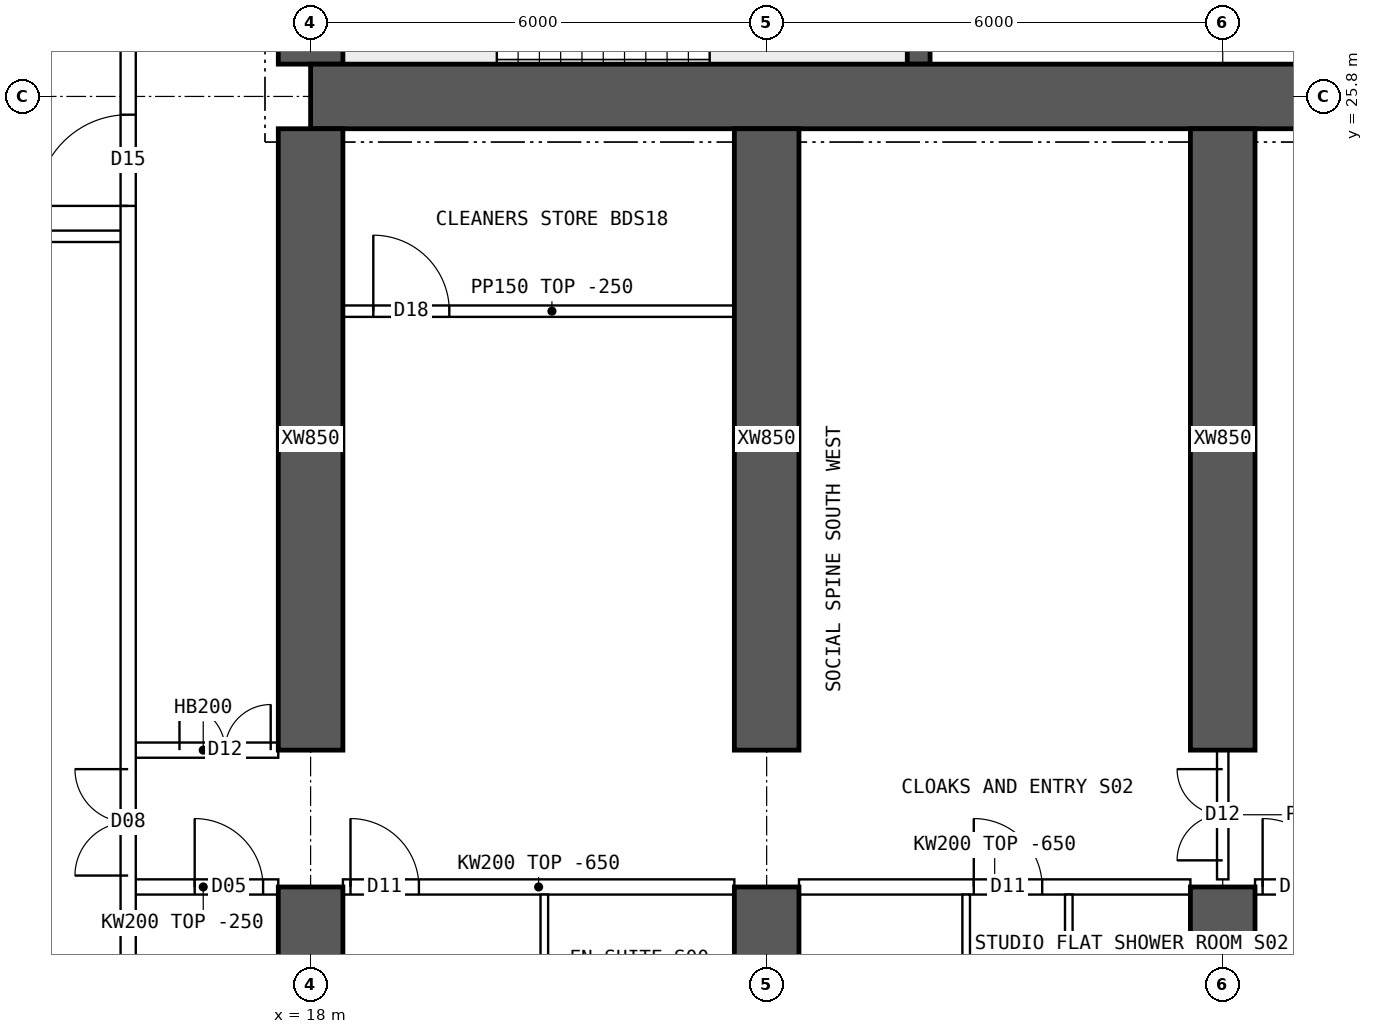
"""IFC4 building model, lengths in metres.
Left out: names, types, materials, properties, quantities, classifications, styles, units other than length and angle.
Written with IfcOpenShell. Run it as: python <this file> out.ifc"""

import sys

from ifc_helpers import new_model, si_unit, direction, frame, frame_2d, origin, place, context, subcontext, project, spatial, polyline, rectangle, outline, extrude, element, fill, save


model = new_model("IFC4")
c1 = context("Model", 3, precision=1e-05, world=origin(), true_north=direction((0.0, 1.0)))
c2 = subcontext(c1, "Body", "Model", "MODEL_VIEW")
j1 = project(units=[si_unit("LENGTHUNIT", "METRE"), si_unit("PLANEANGLEUNIT", "RADIAN")], contexts=[c1])
p1 = place(None, origin())
s1 = spatial("IfcSite", under=j1, at=p1, CompositionType="ELEMENT")
p2 = place(p1, origin())
s2 = spatial("IfcBuilding", under=s1, at=p2, CompositionType="ELEMENT")
p3 = place(p2, frame((0.0, 0.0, 167.35)))
s3 = spatial("IfcBuildingStorey", under=s2, at=p3, CompositionType="ELEMENT", Elevation=167.35)
p4 = place(p3, frame((18.0, 25.8, 0.0), z_axis=(0.0, 0.0, 1.0), x_axis=(1.0, 0.0, 0.0)))
e1 = element("IfcWall", 1, at=p4, inside=s3, PredefinedType="SHEAR", context=c2, shape_type="SweptSolid", body=[
    extrude(rectangle(XDim=48.0, YDim=0.85, at=frame_2d((24.0, 0.0))), origin(), (0.0, 0.0, 1.0), 3.75),
])
p5 = place(p3, frame((18.0, 26.225, 0.0), z_axis=(0.0, 0.0, 1.0), x_axis=(0.0, 1.0, 0.0)))
e2 = element("IfcWall", 2, at=p5, inside=s3, PredefinedType="SHEAR", context=c2, shape_type="SweptSolid", body=[
    extrude(rectangle(XDim=11.55, YDim=0.85, at=frame_2d((5.775, 0.0))), origin(), (0.0, 0.0, 1.0), 3.75),
])
p6 = place(p5, frame((5.075, 0.0, 0.0)))
e3 = element("IfcOpeningElement", 3, at=p6, cuts=e2, PredefinedType="OPENING", context=c2, shape_type="SweptSolid", body=[
    extrude(rectangle(XDim=1.2, YDim=2.1, at=frame_2d((0.6, 1.05))), frame((0.0, 0.435, 0.0), z_axis=(0.0, -1.0, 0.0), x_axis=(1.0, 0.0, 0.0)), (0.0, 0.0, 1.0), 0.87),
])
p7 = place(p3, frame((26.0, 26.225, 0.0), z_axis=(0.0, 0.0, 1.0), x_axis=(0.0, 1.0, 0.0)))
e4 = element("IfcWall", 4, at=p7, inside=s3, PredefinedType="SHEAR", context=c2, shape_type="SweptSolid", body=[
    extrude(rectangle(XDim=4.025, YDim=0.3, at=frame_2d((2.012, 0.0))), origin(), (0.0, 0.0, 1.0), 3.75),
])
p8 = place(p3, frame((18.0, 10.0, 0.0), z_axis=(0.0, 0.0, 1.0), x_axis=(0.0, 1.0, 0.0)))
e5 = element("IfcWall", 5, at=p8, inside=s3, PredefinedType="SHEAR", context=c2, shape_type="SweptSolid", body=[
    extrude(rectangle(XDim=5.4, YDim=0.85, at=frame_2d((2.7, 0.0))), origin(), (0.0, 0.0, 1.0), 3.75),
])
p9 = place(p3, frame((18.0, 17.2, 0.0), z_axis=(0.0, 0.0, 1.0), x_axis=(0.0, 1.0, 0.0)))
e6 = element("IfcWall", 6, at=p9, inside=s3, PredefinedType="SHEAR", context=c2, shape_type="SweptSolid", body=[
    extrude(rectangle(XDim=8.175, YDim=0.85, at=frame_2d((4.087, 0.0))), origin(), (0.0, 0.0, 1.0), 3.75),
])
p10 = place(p3, frame((24.0, 10.0, 0.0), z_axis=(0.0, 0.0, 1.0), x_axis=(0.0, 1.0, 0.0)))
e7 = element("IfcWall", 7, at=p10, inside=s3, PredefinedType="SHEAR", context=c2, shape_type="SweptSolid", body=[
    extrude(rectangle(XDim=5.4, YDim=0.85, at=frame_2d((2.7, 0.0))), origin(), (0.0, 0.0, 1.0), 3.75),
])
p11 = place(p3, frame((24.0, 17.2, 0.0), z_axis=(0.0, 0.0, 1.0), x_axis=(0.0, 1.0, 0.0)))
e8 = element("IfcWall", 8, at=p11, inside=s3, PredefinedType="SHEAR", context=c2, shape_type="SweptSolid", body=[
    extrude(rectangle(XDim=8.175, YDim=0.85, at=frame_2d((4.087, 0.0))), origin(), (0.0, 0.0, 1.0), 3.75),
])
p12 = place(p3, frame((30.0, 10.0, 0.0), z_axis=(0.0, 0.0, 1.0), x_axis=(0.0, 1.0, 0.0)))
e9 = element("IfcWall", 9, at=p12, inside=s3, PredefinedType="SHEAR", context=c2, shape_type="SweptSolid", body=[
    extrude(rectangle(XDim=5.4, YDim=0.85, at=frame_2d((2.7, 0.0))), origin(), (0.0, 0.0, 1.0), 3.75),
])
p13 = place(p3, frame((30.0, 17.2, 0.0), z_axis=(0.0, 0.0, 1.0), x_axis=(0.0, 1.0, 0.0)))
e10 = element("IfcWall", 10, at=p13, inside=s3, PredefinedType="SHEAR", context=c2, shape_type="SweptSolid", body=[
    extrude(rectangle(XDim=8.175, YDim=0.85, at=frame_2d((4.087, 0.0))), origin(), (0.0, 0.0, 1.0), 3.75),
])
p14 = place(p3, frame((15.6, 15.4, 0.0), z_axis=(0.0, 0.0, 1.0), x_axis=(1.0, 0.0, 0.0)))
e11 = element("IfcWall", 11, at=p14, inside=s3, PredefinedType="SOLIDWALL", context=c2, shape_type="SweptSolid", body=[
    extrude(rectangle(XDim=1.975, YDim=0.2, at=frame_2d((0.987, 0.0))), origin(), (0.0, 0.0, 1.0), 3.5),
])
p15 = place(p14, frame((0.875, 0.0, 0.0)))
e12 = element("IfcOpeningElement", 12, at=p15, cuts=e11, PredefinedType="OPENING", context=c2, shape_type="SweptSolid", body=[
    extrude(rectangle(XDim=0.9, YDim=2.1, at=frame_2d((0.45, 1.05))), frame((0.0, 0.11, 0.0), z_axis=(0.0, -1.0, 0.0), x_axis=(1.0, 0.0, 0.0)), (0.0, 0.0, 1.0), 0.22),
])
p16 = place(p3, frame((15.6, 17.2, 0.0), z_axis=(0.0, 0.0, 1.0), x_axis=(1.0, 0.0, 0.0)))
e13 = element("IfcWall", 13, at=p16, inside=s3, PredefinedType="SOLIDWALL", context=c2, shape_type="SweptSolid", body=[
    extrude(rectangle(XDim=1.975, YDim=0.2, at=frame_2d((0.987, 0.0))), origin(), (0.0, 0.0, 1.0), 3.5),
])
p17 = place(p16, frame((0.675, 0.0, 0.0)))
e14 = element("IfcOpeningElement", 14, at=p17, cuts=e13, PredefinedType="OPENING", context=c2, shape_type="SweptSolid", body=[
    extrude(rectangle(XDim=1.2, YDim=2.1, at=frame_2d((0.6, 1.05))), frame((0.0, 0.11, 0.0), z_axis=(0.0, -1.0, 0.0), x_axis=(1.0, 0.0, 0.0)), (0.0, 0.0, 1.0), 0.22),
])
p18 = place(p3, frame((18.425, 15.4, 0.0), z_axis=(0.0, 0.0, 1.0), x_axis=(1.0, 0.0, 0.0)))
e15 = element("IfcWall", 15, at=p18, inside=s3, PredefinedType="SOLIDWALL", context=c2, shape_type="SweptSolid", body=[
    extrude(outline(polyline([(0.0, 0.0), (5.15, 0.0), (5.15, 3.1), (0.0, 3.1), (0.0, 0.0)])), frame((0.0, 0.1, 0.0), z_axis=(0.0, -1.0, 0.0), x_axis=(1.0, 0.0, 0.0)), (0.0, 0.0, 1.0), 0.2),
])
p19 = place(p18, frame((0.1, 0.0, 0.0)))
e16 = element("IfcOpeningElement", 16, at=p19, cuts=e15, PredefinedType="OPENING", context=c2, shape_type="SweptSolid", body=[
    extrude(rectangle(XDim=0.9, YDim=2.1, at=frame_2d((0.45, 1.05))), frame((0.0, 0.11, 0.0), z_axis=(0.0, -1.0, 0.0), x_axis=(1.0, 0.0, 0.0)), (0.0, 0.0, 1.0), 0.22),
])
p20 = place(p3, frame((24.425, 15.4, 0.0), z_axis=(0.0, 0.0, 1.0), x_axis=(1.0, 0.0, 0.0)))
e17 = element("IfcWall", 17, at=p20, inside=s3, PredefinedType="SOLIDWALL", context=c2, shape_type="SweptSolid", body=[
    extrude(outline(polyline([(0.0, 0.0), (5.15, 0.0), (5.15, 3.1), (0.0, 3.1), (0.0, 0.0)])), frame((0.0, 0.1, 0.0), z_axis=(0.0, -1.0, 0.0), x_axis=(1.0, 0.0, 0.0)), (0.0, 0.0, 1.0), 0.2),
])
p21 = place(p20, frame((2.3, 0.0, 0.0)))
e18 = element("IfcOpeningElement", 18, at=p21, cuts=e17, PredefinedType="OPENING", context=c2, shape_type="SweptSolid", body=[
    extrude(rectangle(XDim=0.9, YDim=2.1, at=frame_2d((0.45, 1.05))), frame((0.0, 0.11, 0.0), z_axis=(0.0, -1.0, 0.0), x_axis=(1.0, 0.0, 0.0)), (0.0, 0.0, 1.0), 0.22),
])
p22 = place(p3, frame((30.425, 15.4, 0.0), z_axis=(0.0, 0.0, 1.0), x_axis=(1.0, 0.0, 0.0)))
e19 = element("IfcWall", 19, at=p22, inside=s3, PredefinedType="SOLIDWALL", context=c2, shape_type="SweptSolid", body=[
    extrude(outline(polyline([(0.0, 0.0), (5.15, 0.0), (5.15, 3.1), (0.0, 3.1), (0.0, 0.0)])), frame((0.0, 0.1, 0.0), z_axis=(0.0, -1.0, 0.0), x_axis=(1.0, 0.0, 0.0)), (0.0, 0.0, 1.0), 0.2),
])
p23 = place(p22, frame((0.1, 0.0, 0.0)))
e20 = element("IfcOpeningElement", 20, at=p23, cuts=e19, PredefinedType="OPENING", context=c2, shape_type="SweptSolid", body=[
    extrude(rectangle(XDim=0.9, YDim=2.1, at=frame_2d((0.45, 1.05))), frame((0.0, 0.11, 0.0), z_axis=(0.0, -1.0, 0.0), x_axis=(1.0, 0.0, 0.0)), (0.0, 0.0, 1.0), 0.22),
])
p24 = place(p3, frame((21.075, 12.55, 0.0), z_axis=(0.0, 0.0, 1.0), x_axis=(0.0, 1.0, 0.0)))
e21 = element("IfcWall", 21, at=p24, inside=s3, PredefinedType="PARTITIONING", context=c2, shape_type="SweptSolid", body=[
    extrude(outline(polyline([(0.0, 0.0), (2.75, 0.0), (2.75, 3.1), (2.702, 3.1), (2.7, 3.5), (0.0, 3.5), (0.0, 0.0)])), frame((0.0, 0.05, 0.0), z_axis=(0.0, -1.0, 0.0), x_axis=(1.0, 0.0, 0.0)), (0.0, 0.0, 1.0), 0.1),
])
p25 = place(p3, frame((26.625, 12.95, 0.0), z_axis=(0.0, 0.0, 1.0), x_axis=(0.0, 1.0, 0.0)))
e22 = element("IfcWall", 22, at=p25, inside=s3, PredefinedType="PARTITIONING", context=c2, shape_type="SweptSolid", body=[
    extrude(outline(polyline([(0.0, 0.0), (2.35, 0.0), (2.35, 3.1), (2.302, 3.1), (2.3, 3.5), (0.0, 3.5), (0.0, 0.0)])), frame((0.0, 0.05, 0.0), z_axis=(0.0, -1.0, 0.0), x_axis=(1.0, 0.0, 0.0)), (0.0, 0.0, 1.0), 0.1),
])
p26 = place(p3, frame((27.975, 12.95, 0.0), z_axis=(0.0, 0.0, 1.0), x_axis=(0.0, 1.0, 0.0)))
e23 = element("IfcWall", 23, at=p26, inside=s3, PredefinedType="PARTITIONING", context=c2, shape_type="SweptSolid", body=[
    extrude(outline(polyline([(0.0, 0.0), (2.35, 0.0), (2.35, 3.1), (2.302, 3.1), (2.3, 3.5), (0.0, 3.5), (0.0, 0.0)])), frame((0.0, 0.05, 0.0), z_axis=(0.0, -1.0, 0.0), x_axis=(1.0, 0.0, 0.0)), (0.0, 0.0, 1.0), 0.1),
])
p27 = place(p26, frame((0.8, 0.0, 0.0)))
e24 = element("IfcOpeningElement", 24, at=p27, cuts=e23, PredefinedType="OPENING", context=c2, shape_type="SweptSolid", body=[
    extrude(rectangle(XDim=0.8, YDim=2.1, at=frame_2d((0.4, 1.05))), frame((0.0, 0.06, 0.0), z_axis=(0.0, -1.0, 0.0), x_axis=(1.0, 0.0, 0.0)), (0.0, 0.0, 1.0), 0.12),
])
p28 = place(p3, frame((18.425, 22.975, 0.0), z_axis=(0.0, 0.0, 1.0), x_axis=(1.0, 0.0, 0.0)))
e25 = element("IfcWall", 25, at=p28, inside=s3, PredefinedType="PARTITIONING", context=c2, shape_type="SweptSolid", body=[
    extrude(rectangle(XDim=5.5, YDim=0.15, at=frame_2d((2.75, 0.0))), origin(), (0.0, 0.0, 1.0), 3.5),
])
p29 = place(p28, frame((0.4, 0.0, 0.0)))
e26 = element("IfcOpeningElement", 26, at=p29, cuts=e25, PredefinedType="OPENING", context=c2, shape_type="SweptSolid", body=[
    extrude(rectangle(XDim=1.0, YDim=2.1, at=frame_2d((0.5, 1.05))), frame((0.0, 0.085, 0.0), z_axis=(0.0, -1.0, 0.0), x_axis=(1.0, 0.0, 0.0)), (0.0, 0.0, 1.0), 0.17),
])
p30 = place(p3, frame((30.0, 15.5, 0.0), z_axis=(0.0, 0.0, 1.0), x_axis=(0.0, 1.0, 0.0)))
e27 = element("IfcWall", 27, at=p30, inside=s3, PredefinedType="PARTITIONING", context=c2, shape_type="SweptSolid", body=[
    extrude(outline(polyline([(0.0, 0.0), (1.7, 0.0), (1.7, 3.1), (0.0, 3.1), (0.0, 0.0)])), frame((0.0, 0.075, 0.0), z_axis=(0.0, -1.0, 0.0), x_axis=(1.0, 0.0, 0.0)), (0.0, 0.0, 1.0), 0.15),
])
p31 = place(p30, frame((0.25, 0.0, 0.0)))
e28 = element("IfcOpeningElement", 28, at=p31, cuts=e27, PredefinedType="OPENING", context=c2, shape_type="SweptSolid", body=[
    extrude(rectangle(XDim=1.2, YDim=2.1, at=frame_2d((0.6, 1.05))), frame((0.0, 0.085, 0.0), z_axis=(0.0, -1.0, 0.0), x_axis=(1.0, 0.0, 0.0)), (0.0, 0.0, 1.0), 0.17),
])
p32 = place(p3, frame((15.6, 10.446, 0.0), z_axis=(0.0, 0.0, 1.0), x_axis=(0.0, 1.0, 0.0)))
e29 = element("IfcWall", 29, at=p32, inside=s3, PredefinedType="SOLIDWALL", context=c2, shape_type="SweptSolid", body=[
    extrude(rectangle(XDim=43.107, YDim=0.2, at=frame_2d((21.554, 0.0))), origin(), (0.0, 0.0, 1.0), 3.5),
])
p33 = place(p32, frame((13.914, 0.0, 0.0)))
e30 = element("IfcOpeningElement", 30, at=p33, cuts=e29, PredefinedType="OPENING", context=c2, shape_type="SweptSolid", body=[
    extrude(rectangle(XDim=1.2, YDim=2.1, at=frame_2d((0.6, 1.05))), frame((0.0, 0.11, 0.0), z_axis=(0.0, -1.0, 0.0), x_axis=(1.0, 0.0, 0.0)), (0.0, 0.0, 1.0), 0.22),
])
p34 = place(p32, frame((5.104, 0.0, 0.0)))
e31 = element("IfcOpeningElement", 31, at=p34, cuts=e29, PredefinedType="OPENING", context=c2, shape_type="SweptSolid", body=[
    extrude(rectangle(XDim=1.4, YDim=2.1, at=frame_2d((0.7, 1.05))), frame((0.0, 0.11, 0.0), z_axis=(0.0, -1.0, 0.0), x_axis=(1.0, 0.0, 0.0)), (0.0, 0.0, 1.0), 0.22),
])
p35 = place(p32, frame((36.504, 0.0, 0.0)))
e32 = element("IfcOpeningElement", 32, at=p35, cuts=e29, PredefinedType="OPENING", context=c2, shape_type="SweptSolid", body=[
    extrude(rectangle(XDim=1.4, YDim=2.1, at=frame_2d((0.7, 1.05))), frame((0.0, 0.11, 0.0), z_axis=(0.0, -1.0, 0.0), x_axis=(1.0, 0.0, 0.0)), (0.0, 0.0, 1.0), 0.22),
])
p36 = place(p3, frame((8.705, 23.96, 0.0), z_axis=(0.0, 0.0, 1.0), x_axis=(1.0, 0.0, 0.0)))
e33 = element("IfcWall", 33, at=p36, inside=s3, PredefinedType="PARTITIONING", context=c2, shape_type="SweptSolid", body=[
    extrude(rectangle(XDim=6.82, YDim=0.15, at=frame_2d((3.41, 0.0))), origin(), (0.0, 0.0, 1.0), 3.5),
])
p37 = place(p17, origin())
e34 = element("IfcDoor", 34, at=p37, inside=s3, OperationType="DOUBLE_DOOR_SINGLE_SWING", PredefinedType="DOOR", context=c2, shape_type="SweptSolid", body=[
    extrude(rectangle(XDim=1.2, YDim=2.1, at=frame_2d((0.6, 1.05))), frame((0.0, 0.025, 0.0), z_axis=(0.0, -1.0, 0.0), x_axis=(1.0, 0.0, 0.0)), (0.0, 0.0, 1.0), 0.05),
])
fill(e14, e34)
p38 = place(p19, origin())
e35 = element("IfcDoor", 35, at=p38, inside=s3, OperationType="SINGLE_SWING_LEFT", PredefinedType="DOOR", context=c2, shape_type="SweptSolid", body=[
    extrude(rectangle(XDim=0.9, YDim=2.1, at=frame_2d((0.45, 1.05))), frame((0.0, 0.025, 0.0), z_axis=(0.0, -1.0, 0.0), x_axis=(1.0, 0.0, 0.0)), (0.0, 0.0, 1.0), 0.05),
])
fill(e16, e35)
p39 = place(p27, origin())
e36 = element("IfcDoor", 36, at=p39, inside=s3, OperationType="SINGLE_SWING_RIGHT", PredefinedType="DOOR", context=c2, shape_type="SweptSolid", body=[
    extrude(rectangle(XDim=0.8, YDim=2.1, at=frame_2d((0.4, 1.05))), frame((0.0, 0.025, 0.0), z_axis=(0.0, -1.0, 0.0), x_axis=(1.0, 0.0, 0.0)), (0.0, 0.0, 1.0), 0.05),
])
fill(e24, e36)
p40 = place(p21, origin())
e37 = element("IfcDoor", 37, at=p40, inside=s3, OperationType="SINGLE_SWING_LEFT", PredefinedType="DOOR", context=c2, shape_type="SweptSolid", body=[
    extrude(rectangle(XDim=0.9, YDim=2.1, at=frame_2d((0.45, 1.05))), frame((0.0, 0.025, 0.0), z_axis=(0.0, -1.0, 0.0), x_axis=(1.0, 0.0, 0.0)), (0.0, 0.0, 1.0), 0.05),
])
fill(e18, e37)
p41 = place(p23, origin())
e38 = element("IfcDoor", 38, at=p41, inside=s3, OperationType="SINGLE_SWING_LEFT", PredefinedType="DOOR", context=c2, shape_type="SweptSolid", body=[
    extrude(rectangle(XDim=0.9, YDim=2.1, at=frame_2d((0.45, 1.05))), frame((0.0, 0.025, 0.0), z_axis=(0.0, -1.0, 0.0), x_axis=(1.0, 0.0, 0.0)), (0.0, 0.0, 1.0), 0.05),
])
fill(e20, e38)
p42 = place(p29, origin())
e39 = element("IfcDoor", 39, at=p42, inside=s3, OperationType="SINGLE_SWING_LEFT", PredefinedType="DOOR", context=c2, shape_type="SweptSolid", body=[
    extrude(rectangle(XDim=1.0, YDim=2.1, at=frame_2d((0.5, 1.05))), frame((0.0, 0.025, 0.0), z_axis=(0.0, -1.0, 0.0), x_axis=(1.0, 0.0, 0.0)), (0.0, 0.0, 1.0), 0.05),
])
fill(e26, e39)
p43 = place(p31, origin())
e40 = element("IfcDoor", 40, at=p43, inside=s3, OperationType="DOUBLE_DOOR_SINGLE_SWING", PredefinedType="DOOR", context=c2, shape_type="SweptSolid", body=[
    extrude(rectangle(XDim=1.2, YDim=2.1, at=frame_2d((0.6, 1.05))), frame((0.0, 0.025, 0.0), z_axis=(0.0, -1.0, 0.0), x_axis=(1.0, 0.0, 0.0)), (0.0, 0.0, 1.0), 0.05),
])
fill(e28, e40)
p44 = place(p33, origin())
e41 = element("IfcDoor", 41, at=p44, inside=s3, OperationType="SINGLE_SWING_LEFT", PredefinedType="DOOR", context=c2, shape_type="SweptSolid", body=[
    extrude(rectangle(XDim=1.2, YDim=2.1, at=frame_2d((0.6, 1.05))), frame((0.0, 0.025, 0.0), z_axis=(0.0, -1.0, 0.0), x_axis=(1.0, 0.0, 0.0)), (0.0, 0.0, 1.0), 0.05),
])
fill(e30, e41)
p45 = place(p34, origin())
e42 = element("IfcDoor", 42, at=p45, inside=s3, OperationType="DOUBLE_DOOR_SINGLE_SWING", PredefinedType="DOOR", context=c2, shape_type="SweptSolid", body=[
    extrude(rectangle(XDim=1.4, YDim=2.1, at=frame_2d((0.7, 1.05))), frame((0.0, 0.025, 0.0), z_axis=(0.0, -1.0, 0.0), x_axis=(1.0, 0.0, 0.0)), (0.0, 0.0, 1.0), 0.05),
])
fill(e31, e42)
p46 = place(p15, origin())
e43 = element("IfcDoor", 43, at=p46, inside=s3, OperationType="SINGLE_SWING_LEFT", PredefinedType="DOOR", context=c2, shape_type="SweptSolid", body=[
    extrude(rectangle(XDim=0.9, YDim=2.1, at=frame_2d((0.45, 1.05))), frame((0.0, 0.025, 0.0), z_axis=(0.0, -1.0, 0.0), x_axis=(1.0, 0.0, 0.0)), (0.0, 0.0, 1.0), 0.05),
])
fill(e12, e43)
save(model, sys.argv[1])
